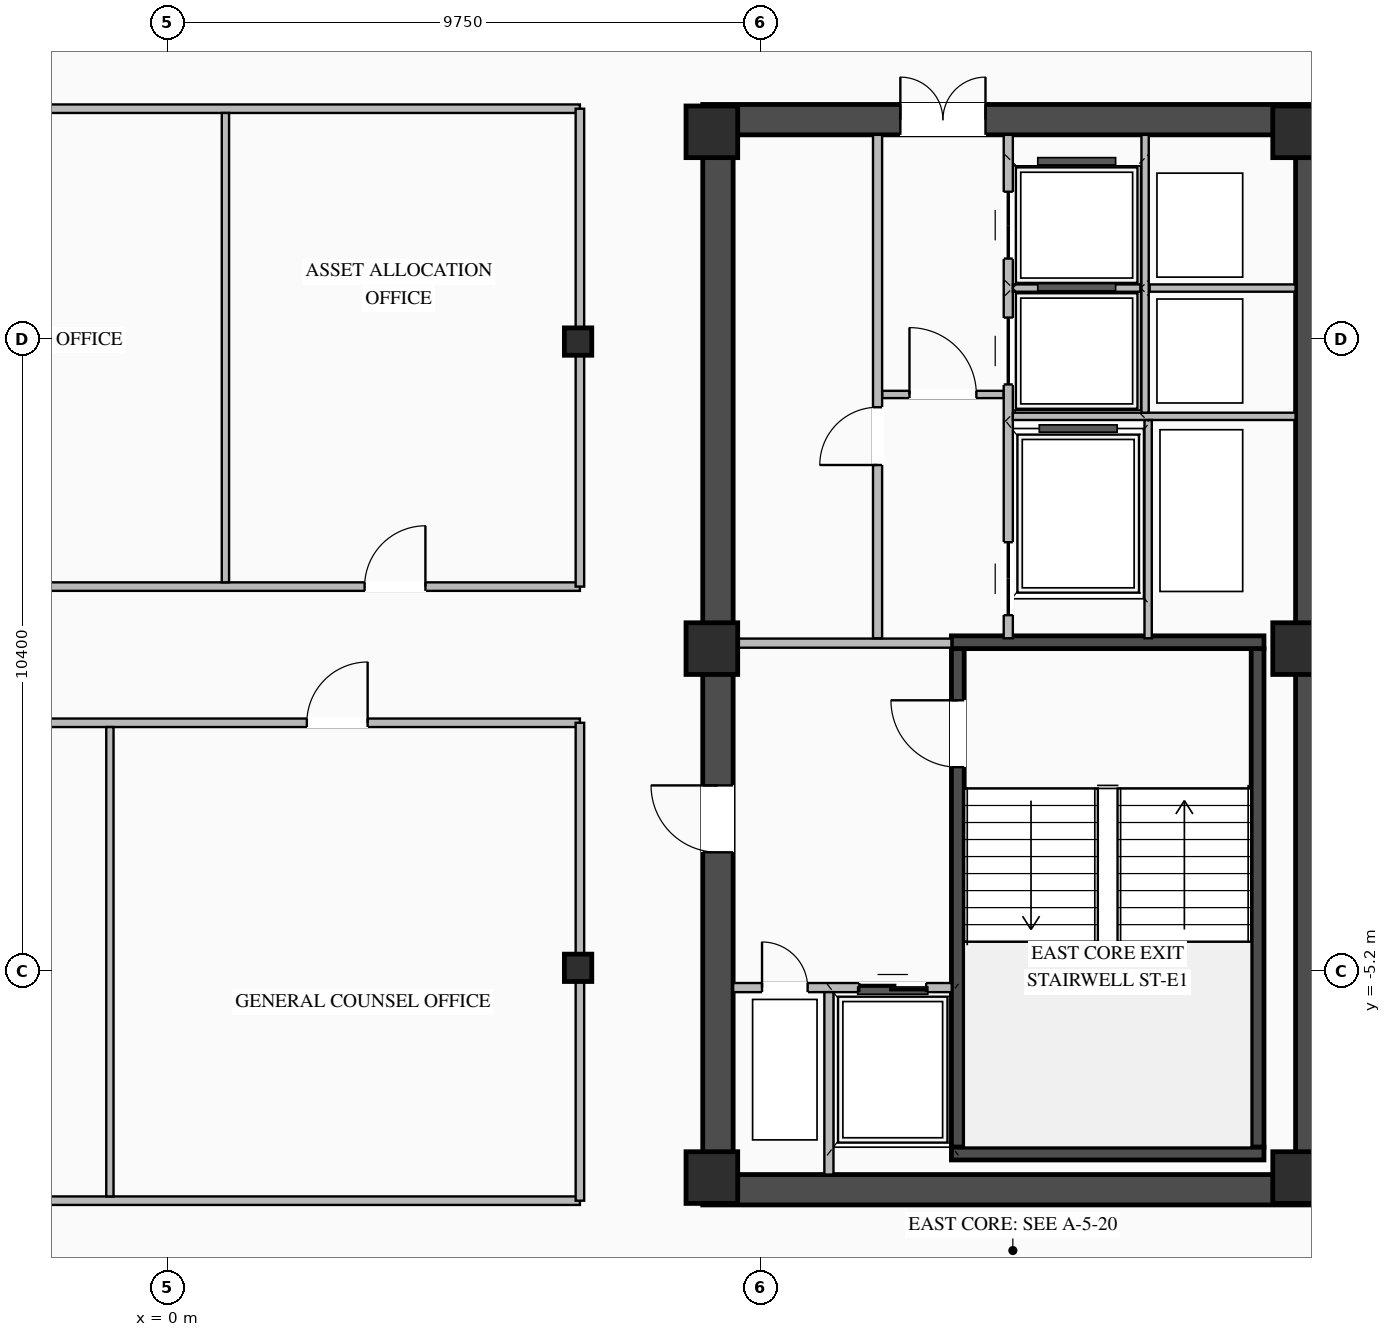
"""IFC4 building model, lengths in metres.
Left out: names, types, materials, properties, quantities, classifications, styles, units other than length and angle.
Written with IfcOpenShell. Run it as: python <this file> out.ifc"""

import sys

from ifc_helpers import new_model, si_unit, direction, frame, frame_2d, origin, origin_2d, place, context, subcontext, project, spatial, rectangle, i_section, extrude, element, fill, save


model = new_model("IFC4")
c1 = context("Model", 3, precision=1e-05, world=origin(), true_north=direction((0.0, 1.0)))
c2 = subcontext(c1, "Body", "Model", "MODEL_VIEW")
j1 = project(units=[si_unit("LENGTHUNIT", "METRE"), si_unit("PLANEANGLEUNIT", "RADIAN")], contexts=[c1])
p1 = place(None, origin())
s1 = spatial("IfcSite", under=j1, at=p1, CompositionType="ELEMENT")
p2 = place(p1, origin())
s2 = spatial("IfcBuilding", under=s1, at=p2, CompositionType="ELEMENT")
p3 = place(p2, frame((0.0, 0.0, 262.05)))
s3 = spatial("IfcBuildingStorey", under=s2, at=p3, CompositionType="ELEMENT", Elevation=262.05)
p4 = place(p3, frame((8.8, -8.8, 0.0), z_axis=(0.0, 0.0, 1.0), x_axis=(1.0, 0.0, 0.0)))
e1 = element("IfcWall", 1, at=p4, inside=s3, PredefinedType="SHEAR", context=c2, shape_type="SweptSolid", body=[
    extrude(rectangle(XDim=10.25, YDim=0.5, at=frame_2d((5.125, 0.0))), origin(), (0.0, 0.0, 1.0), 3.27),
])
p5 = place(p3, frame((8.8, 8.8, 0.0), z_axis=(0.0, 0.0, 1.0), x_axis=(1.0, 0.0, 0.0)))
e2 = element("IfcWall", 2, at=p5, inside=s3, PredefinedType="SHEAR", context=c2, shape_type="SweptSolid", body=[
    extrude(rectangle(XDim=10.25, YDim=0.5, at=frame_2d((5.125, 0.0))), origin(), (0.0, 0.0, 1.0), 3.27),
])
p6 = place(p5, frame((3.25, 0.0, 0.0)))
e3 = element("IfcOpeningElement", 3, at=p6, cuts=e2, PredefinedType="OPENING", context=c2, shape_type="SweptSolid", body=[
    extrude(rectangle(XDim=1.4, YDim=2.05, at=frame_2d((0.7, 1.025))), frame((0.0, 0.26, 0.0), z_axis=(0.0, -1.0, 0.0), x_axis=(1.0, 0.0, 0.0)), (0.0, 0.0, 1.0), 0.52),
])
p7 = place(p3, frame((9.05, -8.55, 0.0), z_axis=(0.0, 0.0, 1.0), x_axis=(0.0, 1.0, 0.0)))
e4 = element("IfcWall", 4, at=p7, inside=s3, PredefinedType="SHEAR", context=c2, shape_type="SweptSolid", body=[
    extrude(rectangle(XDim=17.1, YDim=0.5, at=frame_2d((8.55, 0.0))), origin(), (0.0, 0.0, 1.0), 3.27),
])
p8 = place(p7, frame((5.3, 0.0, 0.0)))
e5 = element("IfcOpeningElement", 5, at=p8, cuts=e4, PredefinedType="OPENING", context=c2, shape_type="SweptSolid", body=[
    extrude(rectangle(XDim=1.1, YDim=2.08, at=frame_2d((0.55, 1.04))), frame((0.0, 0.26, 0.0), z_axis=(0.0, -1.0, 0.0), x_axis=(1.0, 0.0, 0.0)), (0.0, 0.0, 1.0), 0.52),
])
p9 = place(p3, frame((18.8, -8.55, 0.0), z_axis=(0.0, 0.0, 1.0), x_axis=(0.0, 1.0, 0.0)))
e6 = element("IfcWall", 6, at=p9, inside=s3, PredefinedType="SHEAR", context=c2, shape_type="SweptSolid", body=[
    extrude(rectangle(XDim=17.1, YDim=0.5, at=frame_2d((8.55, 0.0))), origin(), (0.0, 0.0, 1.0), 3.27),
])
p10 = place(p3, frame((12.995, -8.1, 0.0), z_axis=(0.0, 0.0, 1.0), x_axis=(0.0, 1.0, 0.0)))
e7 = element("IfcWall", 7, at=p10, inside=s3, PredefinedType="SHEAR", context=c2, shape_type="SweptSolid", body=[
    extrude(rectangle(XDim=8.2, YDim=0.21, at=frame_2d((4.1, 0.0))), origin(), (0.0, 0.0, 1.0), 3.27),
])
p11 = place(p10, frame((6.25, 0.0, 0.0)))
e8 = element("IfcOpeningElement", 8, at=p11, cuts=e7, PredefinedType="OPENING", context=c2, shape_type="SweptSolid", body=[
    extrude(rectangle(XDim=1.1, YDim=2.15, at=frame_2d((0.55, 1.075))), frame((0.0, 0.115, 0.0), z_axis=(0.0, -1.0, 0.0), x_axis=(1.0, 0.0, 0.0)), (0.0, 0.0, 1.0), 0.23),
])
p12 = place(p3, frame((17.925, -8.1, 0.0), z_axis=(0.0, 0.0, 1.0), x_axis=(0.0, 1.0, 0.0)))
e9 = element("IfcWall", 9, at=p12, inside=s3, PredefinedType="SHEAR", context=c2, shape_type="SweptSolid", body=[
    extrude(rectangle(XDim=8.2, YDim=0.21, at=frame_2d((4.1, 0.0))), origin(), (0.0, 0.0, 1.0), 3.27),
])
for number, where, z_axis, x_axis in (
    (10, (12.89, -8.205, 0.0), (0.0, 0.0, 1.0), (1.0, 0.0, 0.0)),
    (11, (18.03, 0.205, 0.0), (0.0, 0.0, 1.0), (-1.0, 0.0, 0.0)),
):
    element("IfcWall", number, at=place(p3, frame(where, z_axis=z_axis, x_axis=x_axis)), inside=s3, PredefinedType="SHEAR", context=c2, shape_type="SweptSolid", body=[
        extrude(rectangle(XDim=5.14, YDim=0.21, at=frame_2d((2.57, 0.0))), origin(), (0.0, 0.0, 1.0), 3.27),
    ])
for number, where, z_axis, x_axis in (
    (12, (8.95, -8.6, 0.0), (0.0, 0.0, 1.0), (1.0, 0.0, 0.0)),
    (13, (8.95, 0.1, 0.0), (0.0, 0.0, 1.0), (1.0, 0.0, 0.0)),
    (14, (8.95, 8.6, 0.0), (0.0, 0.0, 1.0), (1.0, 0.0, 0.0)),
    (15, (18.6, -8.6, 0.0), (0.0, 0.0, 1.0), (1.0, 0.0, 0.0)),
    (16, (18.6, 0.1, 0.0), (0.0, 0.0, 1.0), (1.0, 0.0, 0.0)),
    (17, (18.6, 8.6, 0.0), (0.0, 0.0, 1.0), (1.0, 0.0, 0.0)),
):
    element("IfcColumn", number, at=place(p3, frame(where, z_axis=z_axis, x_axis=x_axis)), inside=s3, PredefinedType="COLUMN", context=c2, shape_type="SweptSolid", body=[
        extrude(rectangle(XDim=0.85, YDim=0.85, at=origin_2d()), origin(), (0.0, 0.0, 1.0), 3.45),
    ])
for number, where, z_axis, x_axis in (
    (18, (6.75, -5.15, 0.0), (0.0, 0.0, 1.0), (1.0, 0.0, 0.0)),
    (19, (6.75, 5.15, 0.0), (0.0, 0.0, 1.0), (1.0, 0.0, 0.0)),
):
    element("IfcColumn", number, at=place(p3, frame(where, z_axis=z_axis, x_axis=x_axis)), inside=s3, PredefinedType="COLUMN", context=c2, shape_type="SweptSolid", body=[
        extrude(i_section(OverallWidth=0.45, OverallDepth=0.45, WebThickness=0.022, FlangeThickness=0.032, at=origin_2d()), origin(), (0.0, 0.0, 1.0), 3.45),
    ])
p13 = place(p3, frame((9.3, -5.475, 0.0), z_axis=(0.0, 0.0, 1.0), x_axis=(1.0, 0.0, 0.0)))
e20 = element("IfcWall", 20, at=p13, inside=s3, PredefinedType="STANDARD", context=c2, shape_type="SweptSolid", body=[
    extrude(rectangle(XDim=3.595, YDim=0.15, at=frame_2d((1.797, 0.0))), origin(), (0.0, 0.0, 1.0), 3.25),
])
p14 = place(p13, frame((2.075, 0.0, 0.0)))
e21 = element("IfcOpeningElement", 21, at=p14, cuts=e20, PredefinedType="OPENING", context=c2, shape_type="SweptSolid", body=[
    extrude(rectangle(XDim=1.1, YDim=2.15, at=frame_2d((0.55, 1.075))), frame((0.0, 0.085, 0.0), z_axis=(0.0, -1.0, 0.0), x_axis=(1.0, 0.0, 0.0)), (0.0, 0.0, 1.0), 0.17),
])
p15 = place(p13, frame((0.475, 0.0, 0.0)))
e22 = element("IfcOpeningElement", 22, at=p15, cuts=e20, PredefinedType="OPENING", context=c2, shape_type="SweptSolid", body=[
    extrude(rectangle(XDim=0.75, YDim=2.05, at=frame_2d((0.375, 1.025))), frame((0.0, 0.085, 0.0), z_axis=(0.0, -1.0, 0.0), x_axis=(1.0, 0.0, 0.0)), (0.0, 0.0, 1.0), 0.17),
])
p16 = place(p3, frame((10.875, -8.55, 0.0), z_axis=(0.0, 0.0, 1.0), x_axis=(0.0, 1.0, 0.0)))
e23 = element("IfcWall", 23, at=p16, inside=s3, PredefinedType="STANDARD", context=c2, shape_type="SweptSolid", body=[
    extrude(rectangle(XDim=3.0, YDim=0.15, at=frame_2d((1.5, 0.0))), origin(), (0.0, 0.0, 1.0), 3.25),
])
p17 = place(p3, frame((9.3, 0.19, 0.0), z_axis=(0.0, 0.0, 1.0), x_axis=(1.0, 0.0, 0.0)))
e24 = element("IfcWall", 24, at=p17, inside=s3, PredefinedType="STANDARD", context=c2, shape_type="SweptSolid", body=[
    extrude(rectangle(XDim=3.59, YDim=0.15, at=frame_2d((1.795, 0.0))), origin(), (0.0, 0.0, 1.0), 2.645),
])
p18 = place(p3, frame((11.75, 4.28, 0.0), z_axis=(0.0, 0.0, 1.0), x_axis=(1.0, 0.0, 0.0)))
e25 = element("IfcWall", 25, at=p18, inside=s3, PredefinedType="STANDARD", context=c2, shape_type="SweptSolid", body=[
    extrude(rectangle(XDim=2.0, YDim=0.12, at=frame_2d((1.0, 0.0))), origin(), (0.0, 0.0, 1.0), 3.25),
])
p19 = place(p18, frame((0.45, 0.0, 0.0)))
e26 = element("IfcOpeningElement", 26, at=p19, cuts=e25, PredefinedType="OPENING", context=c2, shape_type="SweptSolid", body=[
    extrude(rectangle(XDim=1.1, YDim=2.1, at=frame_2d((0.55, 1.05))), frame((0.0, 0.07, 0.0), z_axis=(0.0, -1.0, 0.0), x_axis=(1.0, 0.0, 0.0)), (0.0, 0.0, 1.0), 0.14),
])
p20 = place(p3, frame((11.675, 0.27, 0.0), z_axis=(0.0, 0.0, 1.0), x_axis=(0.0, 1.0, 0.0)))
e27 = element("IfcWall", 27, at=p20, inside=s3, PredefinedType="STANDARD", context=c2, shape_type="SweptSolid", body=[
    extrude(rectangle(XDim=8.28, YDim=0.15, at=frame_2d((4.14, 0.0))), origin(), (0.0, 0.0, 1.0), 3.25),
])
p21 = place(p20, frame((2.85, 0.0, 0.0)))
e28 = element("IfcOpeningElement", 28, at=p21, cuts=e27, PredefinedType="OPENING", context=c2, shape_type="SweptSolid", body=[
    extrude(rectangle(XDim=0.95, YDim=2.05, at=frame_2d((0.475, 1.025))), frame((0.0, 0.085, 0.0), z_axis=(0.0, -1.0, 0.0), x_axis=(1.0, 0.0, 0.0)), (0.0, 0.0, 1.0), 0.17),
])
p22 = place(p3, frame((13.825, 0.27, 0.0), z_axis=(0.0, 0.0, 1.0), x_axis=(0.0, 1.0, 0.0)))
e29 = element("IfcWall", 29, at=p22, inside=s3, PredefinedType="STANDARD", context=c2, shape_type="SweptSolid", body=[
    extrude(rectangle(XDim=8.28, YDim=0.15, at=frame_2d((4.14, 0.0))), origin(), (0.0, 0.0, 1.0), 3.25),
])
p23 = place(p22, frame((4.175, 0.0, 0.0)))
e30 = element("IfcOpeningElement", 30, at=p23, cuts=e29, PredefinedType="OPENING", context=c2, shape_type="SweptSolid", body=[
    extrude(rectangle(XDim=1.1, YDim=2.1, at=frame_2d((0.55, 1.05))), frame((0.0, 0.085, 0.0), z_axis=(0.0, -1.0, 0.0), x_axis=(1.0, 0.0, 0.0)), (0.0, 0.0, 1.0), 0.17),
])
p24 = place(p22, frame((6.245, 0.0, 0.0)))
e31 = element("IfcOpeningElement", 31, at=p24, cuts=e29, PredefinedType="OPENING", context=c2, shape_type="SweptSolid", body=[
    extrude(rectangle(XDim=1.1, YDim=2.1, at=frame_2d((0.55, 1.05))), frame((0.0, 0.085, 0.0), z_axis=(0.0, -1.0, 0.0), x_axis=(1.0, 0.0, 0.0)), (0.0, 0.0, 1.0), 0.17),
])
p25 = place(p22, frame((0.38, 0.0, 0.0)))
e32 = element("IfcOpeningElement", 32, at=p25, cuts=e29, PredefinedType="OPENING", context=c2, shape_type="SweptSolid", body=[
    extrude(rectangle(XDim=1.2, YDim=2.1, at=frame_2d((0.6, 1.05))), frame((0.0, 0.085, 0.0), z_axis=(0.0, -1.0, 0.0), x_axis=(1.0, 0.0, 0.0)), (0.0, 0.0, 1.0), 0.17),
])
p26 = place(p3, frame((13.9, 3.92, 0.0), z_axis=(0.0, 0.0, 1.0), x_axis=(1.0, 0.0, 0.0)))
e33 = element("IfcWall", 33, at=p26, inside=s3, PredefinedType="STANDARD", context=c2, shape_type="SweptSolid", body=[
    extrude(rectangle(XDim=4.65, YDim=0.12, at=frame_2d((2.325, 0.0))), origin(), (0.0, 0.0, 1.0), 3.25),
])
p27 = place(p3, frame((16.15, 6.03, 0.0), z_axis=(0.0, 0.0, 1.0), x_axis=(1.0, 0.0, 0.0)))
e34 = element("IfcWall", 34, at=p27, inside=s3, PredefinedType="STANDARD", context=c2, shape_type="SweptSolid", body=[
    extrude(rectangle(XDim=2.4, YDim=0.12, at=frame_2d((1.2, 0.0))), origin(), (0.0, 0.0, 1.0), 3.25),
])
p28 = place(p3, frame((16.075, 3.98, 0.0), z_axis=(0.0, 0.0, 1.0), x_axis=(0.0, 1.0, 0.0)))
e35 = element("IfcWall", 35, at=p28, inside=s3, PredefinedType="STANDARD", context=c2, shape_type="SweptSolid", body=[
    extrude(rectangle(XDim=4.57, YDim=0.12, at=frame_2d((2.285, 0.0))), origin(), (0.0, 0.0, 1.0), 3.25),
])
p29 = place(p3, frame((13.9, 6.03, 0.0), z_axis=(0.0, 0.0, 1.0), x_axis=(1.0, 0.0, 0.0)))
e36 = element("IfcWall", 36, at=p29, inside=s3, PredefinedType="STANDARD", context=c2, shape_type="SweptSolid", body=[
    extrude(rectangle(XDim=2.1, YDim=0.12, at=frame_2d((1.05, 0.0))), origin(), (0.0, 0.0, 1.0), 3.25),
])
p30 = place(p3, frame((16.125, 0.27, 0.0), z_axis=(0.0, 0.0, 1.0), x_axis=(0.0, 1.0, 0.0)))
e37 = element("IfcWall", 37, at=p30, inside=s3, PredefinedType="STANDARD", context=c2, shape_type="SweptSolid", body=[
    extrude(rectangle(XDim=3.59, YDim=0.12, at=frame_2d((1.795, 0.0))), origin(), (0.0, 0.0, 1.0), 3.25),
])
p31 = place(p3, frame((-6.78, 1.12, 0.0), z_axis=(0.0, 0.0, 1.0), x_axis=(1.0, 0.0, 0.0)))
e38 = element("IfcWall", 38, at=p31, inside=s3, PredefinedType="STANDARD", context=c2, shape_type="SweptSolid", body=[
    extrude(rectangle(XDim=13.56, YDim=0.14, at=frame_2d((6.78, 0.0))), origin(), (0.0, 0.0, 1.0), 3.25),
])
p32 = place(p31, frame((3.491, 0.0, 0.0)))
e39 = element("IfcOpeningElement", 39, at=p32, cuts=e38, PredefinedType="OPENING", context=c2, shape_type="SweptSolid", body=[
    extrude(rectangle(XDim=1.0, YDim=2.08, at=frame_2d((0.5, 1.04))), frame((0.0, 0.08, 0.0), z_axis=(0.0, -1.0, 0.0), x_axis=(1.0, 0.0, 0.0)), (0.0, 0.0, 1.0), 0.16),
])
p33 = place(p31, frame((10.019, 0.0, 0.0)))
e40 = element("IfcOpeningElement", 40, at=p33, cuts=e38, PredefinedType="OPENING", context=c2, shape_type="SweptSolid", body=[
    extrude(rectangle(XDim=1.0, YDim=2.08, at=frame_2d((0.5, 1.04))), frame((0.0, 0.08, 0.0), z_axis=(0.0, -1.0, 0.0), x_axis=(1.0, 0.0, 0.0)), (0.0, 0.0, 1.0), 0.16),
])
p34 = place(p3, frame((-6.78, 8.98, 0.0), z_axis=(0.0, 0.0, 1.0), x_axis=(1.0, 0.0, 0.0)))
e41 = element("IfcWall", 41, at=p34, inside=s3, PredefinedType="STANDARD", context=c2, shape_type="SweptSolid", body=[
    extrude(rectangle(XDim=13.56, YDim=0.14, at=frame_2d((6.78, 0.0))), origin(), (0.0, 0.0, 1.0), 3.25),
])
p35 = place(p3, frame((6.78, 1.12, 0.0), z_axis=(0.0, 0.0, 1.0), x_axis=(0.0, 1.0, 0.0)))
e42 = element("IfcWall", 42, at=p35, inside=s3, PredefinedType="STANDARD", context=c2, shape_type="SweptSolid", body=[
    extrude(rectangle(XDim=7.86, YDim=0.14, at=frame_2d((3.93, 0.0))), origin(), (0.0, 0.0, 1.0), 2.645),
])
p36 = place(p3, frame((0.95, 1.19, 0.0), z_axis=(0.0, 0.0, 1.0), x_axis=(0.0, 1.0, 0.0)))
e43 = element("IfcWall", 43, at=p36, inside=s3, PredefinedType="STANDARD", context=c2, shape_type="SweptSolid", body=[
    extrude(rectangle(XDim=7.72, YDim=0.12, at=frame_2d((3.86, 0.0))), origin(), (0.0, 0.0, 1.0), 3.25),
])
p37 = place(p3, frame((-6.78, -1.12, 0.0), z_axis=(0.0, 0.0, 1.0), x_axis=(1.0, 0.0, 0.0)))
e44 = element("IfcWall", 44, at=p37, inside=s3, PredefinedType="STANDARD", context=c2, shape_type="SweptSolid", body=[
    extrude(rectangle(XDim=13.56, YDim=0.14, at=frame_2d((6.78, 0.0))), origin(), (0.0, 0.0, 1.0), 3.25),
])
p38 = place(p37, frame((2.541, 0.0, 0.0)))
e45 = element("IfcOpeningElement", 45, at=p38, cuts=e44, PredefinedType="OPENING", context=c2, shape_type="SweptSolid", body=[
    extrude(rectangle(XDim=1.0, YDim=2.08, at=frame_2d((0.5, 1.04))), frame((0.0, 0.08, 0.0), z_axis=(0.0, -1.0, 0.0), x_axis=(1.0, 0.0, 0.0)), (0.0, 0.0, 1.0), 0.16),
])
p39 = place(p37, frame((9.069, 0.0, 0.0)))
e46 = element("IfcOpeningElement", 46, at=p39, cuts=e44, PredefinedType="OPENING", context=c2, shape_type="SweptSolid", body=[
    extrude(rectangle(XDim=1.0, YDim=2.08, at=frame_2d((0.5, 1.04))), frame((0.0, 0.08, 0.0), z_axis=(0.0, -1.0, 0.0), x_axis=(1.0, 0.0, 0.0)), (0.0, 0.0, 1.0), 0.16),
])
p40 = place(p3, frame((-6.78, -8.98, 0.0), z_axis=(0.0, 0.0, 1.0), x_axis=(1.0, 0.0, 0.0)))
e47 = element("IfcWall", 47, at=p40, inside=s3, PredefinedType="STANDARD", context=c2, shape_type="SweptSolid", body=[
    extrude(rectangle(XDim=13.56, YDim=0.14, at=frame_2d((6.78, 0.0))), origin(), (0.0, 0.0, 1.0), 3.25),
])
p41 = place(p3, frame((6.78, -8.98, 0.0), z_axis=(0.0, 0.0, 1.0), x_axis=(0.0, 1.0, 0.0)))
e48 = element("IfcWall", 48, at=p41, inside=s3, PredefinedType="STANDARD", context=c2, shape_type="SweptSolid", body=[
    extrude(rectangle(XDim=7.86, YDim=0.14, at=frame_2d((3.93, 0.0))), origin(), (0.0, 0.0, 1.0), 2.645),
])
p42 = place(p3, frame((-0.95, -8.91, 0.0), z_axis=(0.0, 0.0, 1.0), x_axis=(0.0, 1.0, 0.0)))
e49 = element("IfcWall", 49, at=p42, inside=s3, PredefinedType="STANDARD", context=c2, shape_type="SweptSolid", body=[
    extrude(rectangle(XDim=7.72, YDim=0.12, at=frame_2d((3.86, 0.0))), origin(), (0.0, 0.0, 1.0), 3.25),
])
p43 = place(p11, origin())
e50 = element("IfcDoor", 50, at=p43, inside=s3, OperationType="SINGLE_SWING_RIGHT", PredefinedType="DOOR", context=c2, shape_type="SweptSolid", body=[
    extrude(rectangle(XDim=1.1, YDim=2.15, at=frame_2d((0.55, 1.075))), frame((0.0, 0.025, 0.0), z_axis=(0.0, -1.0, 0.0), x_axis=(1.0, 0.0, 0.0)), (0.0, 0.0, 1.0), 0.05),
])
fill(e8, e50)
p44 = place(p14, origin())
e51 = element("IfcDoor", 51, at=p44, inside=s3, OperationType="DOUBLE_DOOR_SLIDING", PredefinedType="DOOR", context=c2, shape_type="SweptSolid", body=[
    extrude(rectangle(XDim=1.1, YDim=2.15, at=frame_2d((0.55, 1.075))), frame((0.0, 0.025, 0.0), z_axis=(0.0, -1.0, 0.0), x_axis=(1.0, 0.0, 0.0)), (0.0, 0.0, 1.0), 0.05),
])
fill(e21, e51)
p45 = place(p15, origin())
e52 = element("IfcDoor", 52, at=p45, inside=s3, OperationType="SINGLE_SWING_LEFT", PredefinedType="DOOR", context=c2, shape_type="SweptSolid", body=[
    extrude(rectangle(XDim=0.75, YDim=2.05, at=frame_2d((0.375, 1.025))), frame((0.0, 0.025, 0.0), z_axis=(0.0, -1.0, 0.0), x_axis=(1.0, 0.0, 0.0)), (0.0, 0.0, 1.0), 0.05),
])
fill(e22, e52)
p46 = place(p8, origin())
e53 = element("IfcDoor", 53, at=p46, inside=s3, OperationType="SINGLE_SWING_RIGHT", PredefinedType="DOOR", context=c2, shape_type="SweptSolid", body=[
    extrude(rectangle(XDim=1.1, YDim=2.08, at=frame_2d((0.55, 1.04))), frame((0.0, -0.155, 0.0), z_axis=(0.0, -1.0, 0.0), x_axis=(1.0, 0.0, 0.0)), (0.0, 0.0, 1.0), 0.05),
])
fill(e5, e53)
p47 = place(p19, origin())
e54 = element("IfcDoor", 54, at=p47, inside=s3, OperationType="SINGLE_SWING_LEFT", PredefinedType="DOOR", context=c2, shape_type="SweptSolid", body=[
    extrude(rectangle(XDim=1.1, YDim=2.1, at=frame_2d((0.55, 1.05))), frame((0.0, 0.025, 0.0), z_axis=(0.0, -1.0, 0.0), x_axis=(1.0, 0.0, 0.0)), (0.0, 0.0, 1.0), 0.05),
])
fill(e26, e54)
p48 = place(p6, origin())
e55 = element("IfcDoor", 55, at=p48, inside=s3, OperationType="DOUBLE_DOOR_SINGLE_SWING", PredefinedType="DOOR", context=c2, shape_type="SweptSolid", body=[
    extrude(rectangle(XDim=1.4, YDim=2.05, at=frame_2d((0.7, 1.025))), frame((0.0, 0.195, 0.0), z_axis=(0.0, -1.0, 0.0), x_axis=(1.0, 0.0, 0.0)), (0.0, 0.0, 1.0), 0.05),
])
fill(e3, e55)
p49 = place(p21, origin())
e56 = element("IfcDoor", 56, at=p49, inside=s3, OperationType="SINGLE_SWING_LEFT", PredefinedType="DOOR", context=c2, shape_type="SweptSolid", body=[
    extrude(rectangle(XDim=0.95, YDim=2.05, at=frame_2d((0.475, 1.025))), frame((0.0, 0.025, 0.0), z_axis=(0.0, -1.0, 0.0), x_axis=(1.0, 0.0, 0.0)), (0.0, 0.0, 1.0), 0.05),
])
fill(e28, e56)
p50 = place(p23, origin())
e57 = element("IfcDoor", 57, at=p50, inside=s3, OperationType="DOUBLE_DOOR_SLIDING", PredefinedType="DOOR", context=c2, shape_type="SweptSolid", body=[
    extrude(rectangle(XDim=1.1, YDim=2.1, at=frame_2d((0.55, 1.05))), frame((0.0, 0.025, 0.0), z_axis=(0.0, -1.0, 0.0), x_axis=(1.0, 0.0, 0.0)), (0.0, 0.0, 1.0), 0.05),
])
fill(e30, e57)
p51 = place(p24, origin())
e58 = element("IfcDoor", 58, at=p51, inside=s3, OperationType="DOUBLE_DOOR_SLIDING", PredefinedType="DOOR", context=c2, shape_type="SweptSolid", body=[
    extrude(rectangle(XDim=1.1, YDim=2.1, at=frame_2d((0.55, 1.05))), frame((0.0, 0.025, 0.0), z_axis=(0.0, -1.0, 0.0), x_axis=(1.0, 0.0, 0.0)), (0.0, 0.0, 1.0), 0.05),
])
fill(e31, e58)
p52 = place(p25, origin())
e59 = element("IfcDoor", 59, at=p52, inside=s3, OperationType="DOUBLE_DOOR_SLIDING", PredefinedType="DOOR", context=c2, shape_type="SweptSolid", body=[
    extrude(rectangle(XDim=1.2, YDim=2.1, at=frame_2d((0.6, 1.05))), frame((0.0, 0.025, 0.0), z_axis=(0.0, -1.0, 0.0), x_axis=(1.0, 0.0, 0.0)), (0.0, 0.0, 1.0), 0.05),
])
fill(e32, e59)
p53 = place(p33, origin())
e60 = element("IfcDoor", 60, at=p53, inside=s3, OperationType="SINGLE_SWING_RIGHT", PredefinedType="DOOR", context=c2, shape_type="SweptSolid", body=[
    extrude(rectangle(XDim=1.0, YDim=2.08, at=frame_2d((0.5, 1.04))), frame((0.0, 0.025, 0.0), z_axis=(0.0, -1.0, 0.0), x_axis=(1.0, 0.0, 0.0)), (0.0, 0.0, 1.0), 0.05),
])
fill(e40, e60)
p54 = place(p39, origin())
e61 = element("IfcDoor", 61, at=p54, inside=s3, OperationType="SINGLE_SWING_RIGHT", PredefinedType="DOOR", context=c2, shape_type="SweptSolid", body=[
    extrude(rectangle(XDim=1.0, YDim=2.08, at=frame_2d((0.5, 1.04))), frame((0.0, 0.025, 0.0), z_axis=(0.0, -1.0, 0.0), x_axis=(1.0, 0.0, 0.0)), (0.0, 0.0, 1.0), 0.05),
])
fill(e46, e61)
save(model, sys.argv[1])
